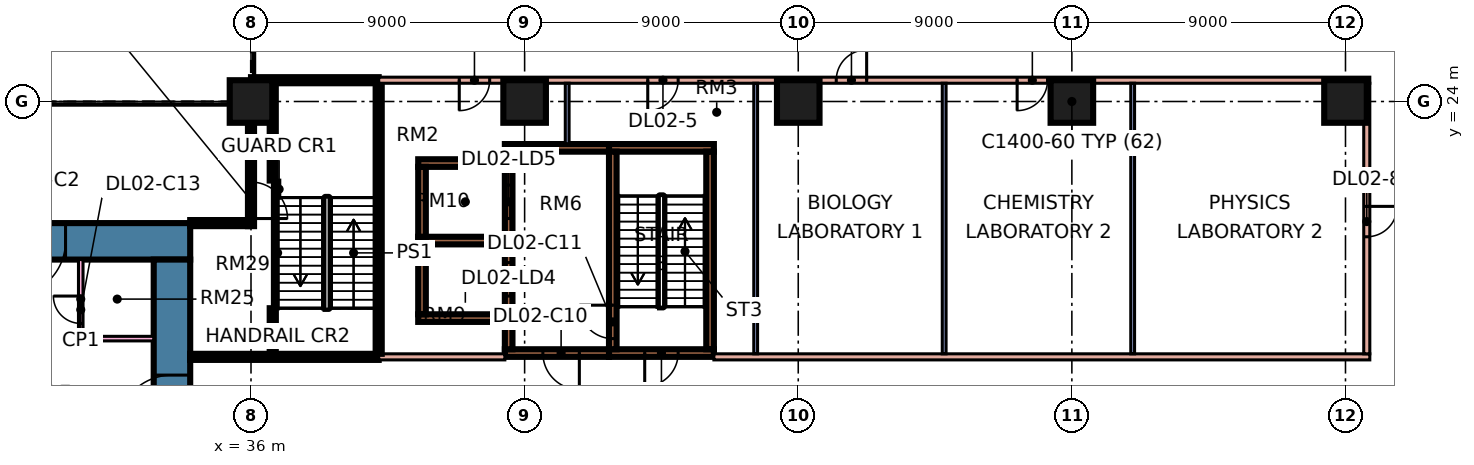
"""IFC4 building model, lengths in metres.
Left out: names, types, materials, properties, quantities, classifications, styles, units other than length and angle.
Written with IfcOpenShell. Run it as: python <this file> out.ifc"""

import sys

from ifc_helpers import new_model, si_unit, direction, frame, frame_2d, origin, origin_2d, place, context, subcontext, project, spatial, rectangle, extrude, element, fill, save


model = new_model("IFC4")
c1 = context("Model", 3, precision=1e-05, world=origin(), true_north=direction((0.0, 1.0)))
c2 = subcontext(c1, "Body", "Model", "MODEL_VIEW")
j1 = project(units=[si_unit("LENGTHUNIT", "METRE"), si_unit("PLANEANGLEUNIT", "RADIAN")], contexts=[c1])
p1 = place(None, origin())
s1 = spatial("IfcSite", under=j1, at=p1, CompositionType="ELEMENT")
p2 = place(p1, origin())
s2 = spatial("IfcBuilding", under=s1, at=p2, CompositionType="ELEMENT")
p3 = place(p2, frame((0.0, 0.0, 12.0)))
s3 = spatial("IfcBuildingStorey", under=s2, at=p3, CompositionType="ELEMENT", Elevation=12.0)
for number, where, z_axis, x_axis in (
    (1, (36.0, 24.0, 0.0), (0.0, 0.0, 1.0), (1.0, 0.0, 0.0)),
    (2, (45.0, 24.0, 0.0), (0.0, 0.0, 1.0), (1.0, 0.0, 0.0)),
    (3, (54.0, 24.0, 0.0), (0.0, 0.0, 1.0), (1.0, 0.0, 0.0)),
    (4, (63.0, 24.0, 0.0), (0.0, 0.0, 1.0), (1.0, 0.0, 0.0)),
    (5, (72.0, 24.0, 0.0), (0.0, 0.0, 1.0), (1.0, 0.0, 0.0)),
):
    element("IfcColumn", number, at=place(p3, frame(where, z_axis=z_axis, x_axis=x_axis)), inside=s3, PredefinedType="COLUMN", context=c2, shape_type="SweptSolid", body=[
        extrude(rectangle(XDim=1.4, YDim=1.4, at=origin_2d()), origin(), (0.0, 0.0, 1.0), 4.8),
    ])
p4 = place(p3, frame((9.0, 19.4, 0.0), z_axis=(0.0, 0.0, 1.0), x_axis=(1.0, 0.0, 0.0)))
e6 = element("IfcWall", 6, at=p4, inside=s3, PredefinedType="SHEAR", context=c2, shape_type="SweptSolid", body=[
    extrude(rectangle(XDim=25.0, YDim=1.2, at=frame_2d((12.5, 0.0))), origin(), (0.0, 0.0, 1.0), 4.8),
])
p5 = place(p4, frame((19.1, 0.0, 0.0)))
e7 = element("IfcOpeningElement", 7, at=p5, cuts=e6, PredefinedType="OPENING", context=c2, shape_type="SweptSolid", body=[
    extrude(rectangle(XDim=1.8, YDim=2.4, at=frame_2d((0.9, 1.2))), frame((0.0, 0.61, 0.0), z_axis=(0.0, -1.0, 0.0), x_axis=(1.0, 0.0, 0.0)), (0.0, 0.0, 1.0), 1.22),
])
p6 = place(p3, frame((33.4, 8.2, 0.0), z_axis=(0.0, 0.0, 1.0), x_axis=(0.0, 1.0, 0.0)))
e8 = element("IfcWall", 8, at=p6, inside=s3, PredefinedType="SHEAR", context=c2, shape_type="SweptSolid", body=[
    extrude(rectangle(XDim=10.6, YDim=1.2, at=frame_2d((5.3, 0.0))), origin(), (0.0, 0.0, 1.0), 4.8),
])
p7 = place(p6, frame((5.0, 0.0, 0.0)))
e9 = element("IfcOpeningElement", 9, at=p7, cuts=e8, PredefinedType="OPENING", context=c2, shape_type="SweptSolid", body=[
    extrude(rectangle(XDim=1.8, YDim=2.4, at=frame_2d((0.9, 1.2))), frame((0.0, 0.61, 0.0), z_axis=(0.0, -1.0, 0.0), x_axis=(1.0, 0.0, 0.0)), (0.0, 0.0, 1.0), 1.22),
])
p8 = place(p3, frame((47.775, 15.725, 0.0), z_axis=(0.0, 0.0, 1.0), x_axis=(1.0, 0.0, 0.0)))
e10 = element("IfcWall", 10, at=p8, inside=s3, PredefinedType="SHEAR", context=c2, shape_type="SweptSolid", body=[
    extrude(rectangle(XDim=3.45, YDim=0.25, at=frame_2d((1.725, 0.0))), origin(), (0.0, 0.0, 1.0), 4.8),
])
p9 = place(p8, frame((1.175, 0.0, 0.0)))
e11 = element("IfcOpeningElement", 11, at=p9, cuts=e10, PredefinedType="OPENING", context=c2, shape_type="SweptSolid", body=[
    extrude(rectangle(XDim=1.1, YDim=2.2, at=frame_2d((0.55, 1.1))), frame((0.0, 0.135, 0.0), z_axis=(0.0, -1.0, 0.0), x_axis=(1.0, 0.0, 0.0)), (0.0, 0.0, 1.0), 0.27),
])
p10 = place(p3, frame((47.775, 22.475, 0.0), z_axis=(0.0, 0.0, 1.0), x_axis=(1.0, 0.0, 0.0)))
e12 = element("IfcWall", 12, at=p10, inside=s3, PredefinedType="SHEAR", context=c2, shape_type="SweptSolid", body=[
    extrude(rectangle(XDim=3.45, YDim=0.25, at=frame_2d((1.725, 0.0))), origin(), (0.0, 0.0, 1.0), 4.8),
])
p11 = place(p3, frame((47.9, 15.85, 0.0), z_axis=(0.0, 0.0, 1.0), x_axis=(0.0, 1.0, 0.0)))
e13 = element("IfcWall", 13, at=p11, inside=s3, PredefinedType="SHEAR", context=c2, shape_type="SweptSolid", body=[
    extrude(rectangle(XDim=6.5, YDim=0.25, at=frame_2d((3.25, 0.0))), origin(), (0.0, 0.0, 1.0), 4.8),
])
p12 = place(p11, frame((0.35, 0.0, 0.0)))
e14 = element("IfcOpeningElement", 14, at=p12, cuts=e13, PredefinedType="OPENING", context=c2, shape_type="SweptSolid", body=[
    extrude(rectangle(XDim=1.1, YDim=2.2, at=frame_2d((0.55, 1.1))), frame((0.0, 0.135, 0.0), z_axis=(0.0, -1.0, 0.0), x_axis=(1.0, 0.0, 0.0)), (0.0, 0.0, 1.0), 0.27),
])
p13 = place(p3, frame((51.1, 15.85, 0.0), z_axis=(0.0, 0.0, 1.0), x_axis=(0.0, 1.0, 0.0)))
e15 = element("IfcWall", 15, at=p13, inside=s3, PredefinedType="SHEAR", context=c2, shape_type="SweptSolid", body=[
    extrude(rectangle(XDim=6.5, YDim=0.25, at=frame_2d((3.25, 0.0))), origin(), (0.0, 0.0, 1.0), 4.8),
])
p14 = place(p3, frame((44.35, 15.725, 0.0), z_axis=(0.0, 0.0, 1.0), x_axis=(1.0, 0.0, 0.0)))
e16 = element("IfcWall", 16, at=p14, inside=s3, PredefinedType="SHEAR", context=c2, shape_type="SweptSolid", body=[
    extrude(rectangle(XDim=3.425, YDim=0.25, at=frame_2d((1.712, 0.0))), origin(), (0.0, 0.0, 1.0), 4.8),
])
p15 = place(p14, frame((1.25, 0.0, 0.0)))
e17 = element("IfcOpeningElement", 17, at=p15, cuts=e16, PredefinedType="OPENING", context=c2, shape_type="SweptSolid", body=[
    extrude(rectangle(XDim=1.2, YDim=2.2, at=frame_2d((0.6, 1.1))), frame((0.0, 0.135, 0.0), z_axis=(0.0, -1.0, 0.0), x_axis=(1.0, 0.0, 0.0)), (0.0, 0.0, 1.0), 0.27),
])
p16 = place(p3, frame((44.35, 22.475, 0.0), z_axis=(0.0, 0.0, 1.0), x_axis=(1.0, 0.0, 0.0)))
e18 = element("IfcWall", 18, at=p16, inside=s3, PredefinedType="SHEAR", context=c2, shape_type="SweptSolid", body=[
    extrude(rectangle(XDim=3.425, YDim=0.25, at=frame_2d((1.712, 0.0))), origin(), (0.0, 0.0, 1.0), 4.8),
])
p17 = place(p3, frame((44.475, 15.85, 0.0), z_axis=(0.0, 0.0, 1.0), x_axis=(0.0, 1.0, 0.0)))
e19 = element("IfcWall", 19, at=p17, inside=s3, PredefinedType="SHEAR", context=c2, shape_type="SweptSolid", body=[
    extrude(rectangle(XDim=6.5, YDim=0.25, at=frame_2d((3.25, 0.0))), origin(), (0.0, 0.0, 1.0), 4.8),
])
p18 = place(p17, frame((1.75, 0.0, 0.0)))
e20 = element("IfcOpeningElement", 20, at=p18, cuts=e19, PredefinedType="OPENING", context=c2, shape_type="SweptSolid", body=[
    extrude(rectangle(XDim=1.1, YDim=2.2, at=frame_2d((0.55, 1.1))), frame((0.0, 0.135, 0.0), z_axis=(0.0, -1.0, 0.0), x_axis=(1.0, 0.0, 0.0)), (0.0, 0.0, 1.0), 0.27),
])
p19 = place(p17, frame((4.3, 0.0, 0.0)))
e21 = element("IfcOpeningElement", 21, at=p19, cuts=e19, PredefinedType="OPENING", context=c2, shape_type="SweptSolid", body=[
    extrude(rectangle(XDim=1.1, YDim=2.2, at=frame_2d((0.55, 1.1))), frame((0.0, 0.135, 0.0), z_axis=(0.0, -1.0, 0.0), x_axis=(1.0, 0.0, 0.0)), (0.0, 0.0, 1.0), 0.27),
])
for number, where, z_axis, x_axis in (
    (22, (41.5, 16.875, 0.0), (0.0, 0.0, 1.0), (1.0, 0.0, 0.0)),
    (23, (41.5, 19.425, 0.0), (0.0, 0.0, 1.0), (1.0, 0.0, 0.0)),
    (24, (41.5, 21.975, 0.0), (0.0, 0.0, 1.0), (1.0, 0.0, 0.0)),
):
    element("IfcWall", number, at=place(p3, frame(where, z_axis=z_axis, x_axis=x_axis)), inside=s3, PredefinedType="SHEAR", context=c2, shape_type="SweptSolid", body=[
        extrude(rectangle(XDim=2.85, YDim=0.25, at=frame_2d((1.425, 0.0))), origin(), (0.0, 0.0, 1.0), 4.8),
    ])
for number, where, z_axis, x_axis in (
    (25, (41.625, 17.0, 0.0), (0.0, 0.0, 1.0), (0.0, 1.0, 0.0)),
    (26, (41.625, 19.55, 0.0), (0.0, 0.0, 1.0), (0.0, 1.0, 0.0)),
):
    element("IfcWall", number, at=place(p3, frame(where, z_axis=z_axis, x_axis=x_axis)), inside=s3, PredefinedType="SHEAR", context=c2, shape_type="SweptSolid", body=[
        extrude(rectangle(XDim=2.3, YDim=0.25, at=frame_2d((1.15, 0.0))), origin(), (0.0, 0.0, 1.0), 4.8),
    ])
p20 = place(p3, frame((30.4, 16.2, 0.0), z_axis=(0.0, 0.0, 1.0), x_axis=(0.0, 1.0, 0.0)))
e27 = element("IfcWall", 27, at=p20, inside=s3, PredefinedType="PARTITIONING", context=c2, shape_type="SweptSolid", body=[
    extrude(rectangle(XDim=2.6, YDim=0.15, at=frame_2d((1.3, 0.0))), origin(), (0.0, 0.0, 1.0), 4.4),
])
p21 = place(p20, frame((0.5, 0.0, 0.0)))
e28 = element("IfcOpeningElement", 28, at=p21, cuts=e27, PredefinedType="OPENING", context=c2, shape_type="SweptSolid", body=[
    extrude(rectangle(XDim=0.9, YDim=2.1, at=frame_2d((0.45, 1.05))), frame((0.0, 0.085, 0.0), z_axis=(0.0, -1.0, 0.0), x_axis=(1.0, 0.0, 0.0)), (0.0, 0.0, 1.0), 0.17),
])
p22 = place(p3, frame((30.4, 16.2, 0.0), z_axis=(0.0, 0.0, 1.0), x_axis=(1.0, 0.0, 0.0)))
e29 = element("IfcWall", 29, at=p22, inside=s3, PredefinedType="PARTITIONING", context=c2, shape_type="SweptSolid", body=[
    extrude(rectangle(XDim=2.4, YDim=0.15, at=frame_2d((1.2, 0.0))), origin(), (0.0, 0.0, 1.0), 4.4),
])
p23 = place(p3, frame((34.0, 15.6, 0.0), z_axis=(0.0, 0.0, 1.0), x_axis=(1.0, 0.0, 0.0)))
e30 = element("IfcWall", 30, at=p23, inside=s3, PredefinedType="SOLIDWALL", context=c2, shape_type="SweptSolid", body=[
    extrude(rectangle(XDim=6.2, YDim=0.2, at=frame_2d((3.1, 0.0))), origin(), (0.0, 0.0, 1.0), 4.4),
])
p24 = place(p3, frame((34.0, 20.0, 0.0), z_axis=(0.0, 0.0, 1.0), x_axis=(1.0, 0.0, 0.0)))
e31 = element("IfcWall", 31, at=p24, inside=s3, PredefinedType="SOLIDWALL", context=c2, shape_type="SweptSolid", body=[
    extrude(rectangle(XDim=1.9, YDim=0.2, at=frame_2d((0.95, 0.0))), origin(), (0.0, 0.0, 1.0), 4.4),
])
p25 = place(p3, frame((36.0, 19.9, 0.0), z_axis=(0.0, 0.0, 1.0), x_axis=(0.0, 1.0, 0.0)))
e32 = element("IfcWall", 32, at=p25, inside=s3, PredefinedType="SOLIDWALL", context=c2, shape_type="SweptSolid", body=[
    extrude(rectangle(XDim=4.1, YDim=0.2, at=frame_2d((2.05, 0.0))), origin(), (0.0, 0.0, 1.0), 4.4),
])
p26 = place(p25, frame((0.25, 0.0, 0.0)))
e33 = element("IfcOpeningElement", 33, at=p26, cuts=e32, PredefinedType="OPENING", context=c2, shape_type="SweptSolid", body=[
    extrude(rectangle(XDim=1.2, YDim=2.1, at=frame_2d((0.6, 1.05))), frame((0.0, 0.11, 0.0), z_axis=(0.0, -1.0, 0.0), x_axis=(1.0, 0.0, 0.0)), (0.0, 0.0, 1.0), 0.22),
])
p27 = place(p3, frame((36.0, 24.7, 0.0), z_axis=(0.0, 0.0, 1.0), x_axis=(1.0, 0.0, 0.0)))
e34 = element("IfcWall", 34, at=p27, inside=s3, PredefinedType="SOLIDWALL", context=c2, shape_type="SweptSolid", body=[
    extrude(rectangle(XDim=4.2, YDim=0.2, at=frame_2d((2.1, 0.0))), origin(), (0.0, 0.0, 1.0), 4.4),
])
p28 = place(p3, frame((40.2, 15.6, 0.0), z_axis=(0.0, 0.0, 1.0), x_axis=(1.0, 0.0, 0.0)))
e35 = element("IfcWall", 35, at=p28, inside=s3, PredefinedType="PARTITIONING", context=c2, shape_type="SweptSolid", body=[
    extrude(rectangle(XDim=4.15, YDim=0.2, at=frame_2d((2.075, 0.0))), origin(), (0.0, 0.0, 1.0), 4.4),
])
p29 = place(p3, frame((40.2, 15.7, 0.0), z_axis=(0.0, 0.0, 1.0), x_axis=(0.0, 1.0, 0.0)))
e36 = element("IfcWall", 36, at=p29, inside=s3, PredefinedType="SOLIDWALL", context=c2, shape_type="SweptSolid", body=[
    extrude(rectangle(XDim=8.9, YDim=0.2, at=frame_2d((4.45, 0.0))), origin(), (0.0, 0.0, 1.0), 4.4),
])
p30 = place(p3, frame((40.2, 24.7, 0.0), z_axis=(0.0, 0.0, 1.0), x_axis=(1.0, 0.0, 0.0)))
e37 = element("IfcWall", 37, at=p30, inside=s3, PredefinedType="PARTITIONING", context=c2, shape_type="SweptSolid", body=[
    extrude(rectangle(XDim=32.6, YDim=0.2, at=frame_2d((16.3, 0.0))), origin(), (0.0, 0.0, 1.0), 4.4),
])
p31 = place(p30, frame((2.65, 0.0, 0.0)))
e38 = element("IfcOpeningElement", 38, at=p31, cuts=e37, PredefinedType="OPENING", context=c2, shape_type="SweptSolid", body=[
    extrude(rectangle(XDim=1.0, YDim=2.1, at=frame_2d((0.5, 1.05))), frame((0.0, 0.11, 0.0), z_axis=(0.0, -1.0, 0.0), x_axis=(1.0, 0.0, 0.0)), (0.0, 0.0, 1.0), 0.22),
])
p32 = place(p30, frame((8.85, 0.0, 0.0)))
e39 = element("IfcOpeningElement", 39, at=p32, cuts=e37, PredefinedType="OPENING", context=c2, shape_type="SweptSolid", body=[
    extrude(rectangle(XDim=1.0, YDim=2.1, at=frame_2d((0.5, 1.05))), frame((0.0, 0.11, 0.0), z_axis=(0.0, -1.0, 0.0), x_axis=(1.0, 0.0, 0.0)), (0.0, 0.0, 1.0), 0.22),
])
p33 = place(p30, frame((15.05, 0.0, 0.0)))
e40 = element("IfcOpeningElement", 40, at=p33, cuts=e37, PredefinedType="OPENING", context=c2, shape_type="SweptSolid", body=[
    extrude(rectangle(XDim=1.0, YDim=2.1, at=frame_2d((0.5, 1.05))), frame((0.0, 0.11, 0.0), z_axis=(0.0, -1.0, 0.0), x_axis=(1.0, 0.0, 0.0)), (0.0, 0.0, 1.0), 0.22),
])
p34 = place(p30, frame((21.0, 0.0, 0.0)))
e41 = element("IfcOpeningElement", 41, at=p34, cuts=e37, PredefinedType="OPENING", context=c2, shape_type="SweptSolid", body=[
    extrude(rectangle(XDim=1.0, YDim=2.1, at=frame_2d((0.5, 1.05))), frame((0.0, 0.11, 0.0), z_axis=(0.0, -1.0, 0.0), x_axis=(1.0, 0.0, 0.0)), (0.0, 0.0, 1.0), 0.22),
])
p35 = place(p3, frame((46.4, 22.6, 0.0), z_axis=(0.0, 0.0, 1.0), x_axis=(0.0, 1.0, 0.0)))
e42 = element("IfcWall", 42, at=p35, inside=s3, PredefinedType="PARTITIONING", context=c2, shape_type="SweptSolid", body=[
    extrude(rectangle(XDim=2.0, YDim=0.125, at=frame_2d((1.0, 0.0))), origin(), (0.0, 0.0, 1.0), 4.4),
])
p36 = place(p3, frame((51.225, 15.6, 0.0), z_axis=(0.0, 0.0, 1.0), x_axis=(1.0, 0.0, 0.0)))
e43 = element("IfcWall", 43, at=p36, inside=s3, PredefinedType="PARTITIONING", context=c2, shape_type="SweptSolid", body=[
    extrude(rectangle(XDim=21.575, YDim=0.2, at=frame_2d((10.788, 0.0))), origin(), (0.0, 0.0, 1.0), 4.4),
])
for number, where, z_axis, x_axis in (
    (44, (52.6, 15.7, 0.0), (0.0, 0.0, 1.0), (0.0, 1.0, 0.0)),
    (45, (58.8, 15.7, 0.0), (0.0, 0.0, 1.0), (0.0, 1.0, 0.0)),
    (46, (65.0, 15.7, 0.0), (0.0, 0.0, 1.0), (0.0, 1.0, 0.0)),
):
    element("IfcWall", number, at=place(p3, frame(where, z_axis=z_axis, x_axis=x_axis)), inside=s3, PredefinedType="PARTITIONING", context=c2, shape_type="SweptSolid", body=[
        extrude(rectangle(XDim=8.9, YDim=0.125, at=frame_2d((4.45, 0.0))), origin(), (0.0, 0.0, 1.0), 4.4),
    ])
p37 = place(p3, frame((72.7, 15.7, 0.0), z_axis=(0.0, 0.0, 1.0), x_axis=(0.0, 1.0, 0.0)))
e47 = element("IfcWall", 47, at=p37, inside=s3, PredefinedType="PARTITIONING", context=c2, shape_type="SweptSolid", body=[
    extrude(rectangle(XDim=8.9, YDim=0.2, at=frame_2d((4.45, 0.0))), origin(), (0.0, 0.0, 1.0), 4.4),
])
p38 = place(p37, frame((3.85, 0.0, 0.0)))
e48 = element("IfcOpeningElement", 48, at=p38, cuts=e47, PredefinedType="OPENING", context=c2, shape_type="SweptSolid", body=[
    extrude(rectangle(XDim=1.0, YDim=2.1, at=frame_2d((0.5, 1.05))), frame((0.0, 0.11, 0.0), z_axis=(0.0, -1.0, 0.0), x_axis=(1.0, 0.0, 0.0)), (0.0, 0.0, 1.0), 0.22),
])
p39 = place(p3, frame((36.715, 21.4, 0.0), z_axis=(0.0, 0.0, 1.0), x_axis=(0.0, 1.0, 0.0)))
e49 = element("IfcWall", 49, at=p39, inside=s3, PredefinedType="SOLIDWALL", context=c2, shape_type="SweptSolid", body=[
    extrude(rectangle(XDim=3.2, YDim=0.2, at=frame_2d((1.6, 0.0))), origin(), (0.0, 0.0, 1.0), 4.4),
])
p40 = place(p3, frame((36.715, 15.7, 0.0), z_axis=(0.0, 0.0, 1.0), x_axis=(0.0, 1.0, 0.0)))
e50 = element("IfcWall", 50, at=p40, inside=s3, PredefinedType="SOLIDWALL", context=c2, shape_type="SweptSolid", body=[
    extrude(rectangle(XDim=1.5, YDim=0.2, at=frame_2d((0.75, 0.0))), origin(), (0.0, 0.0, 1.0), 4.4),
])
p41 = place(p7, origin())
e51 = element("IfcDoor", 51, at=p41, inside=s3, OperationType="DOUBLE_DOOR_SINGLE_SWING", PredefinedType="DOOR", context=c2, shape_type="SweptSolid", body=[
    extrude(rectangle(XDim=1.8, YDim=2.4, at=frame_2d((0.9, 1.2))), frame((0.0, 0.025, 0.0), z_axis=(0.0, -1.0, 0.0), x_axis=(1.0, 0.0, 0.0)), (0.0, 0.0, 1.0), 0.05),
])
fill(e9, e51)
p42 = place(p5, frame((1.8, 0.0, 0.0), z_axis=(0.0, 0.0, 1.0), x_axis=(-1.0, 0.0, 0.0)))
e52 = element("IfcDoor", 52, at=p42, inside=s3, OperationType="DOUBLE_DOOR_SINGLE_SWING", PredefinedType="DOOR", context=c2, shape_type="SweptSolid", body=[
    extrude(rectangle(XDim=1.8, YDim=2.4, at=frame_2d((0.9, 1.2))), frame((0.0, 0.025, 0.0), z_axis=(0.0, -1.0, 0.0), x_axis=(1.0, 0.0, 0.0)), (0.0, 0.0, 1.0), 0.05),
])
fill(e7, e52)
p43 = place(p9, frame((1.1, 0.0, 0.0), z_axis=(0.0, 0.0, 1.0), x_axis=(-1.0, 0.0, 0.0)))
e53 = element("IfcDoor", 53, at=p43, inside=s3, OperationType="SINGLE_SWING_LEFT", PredefinedType="DOOR", context=c2, shape_type="SweptSolid", body=[
    extrude(rectangle(XDim=1.1, YDim=2.2, at=frame_2d((0.55, 1.1))), frame((0.0, 0.025, 0.0), z_axis=(0.0, -1.0, 0.0), x_axis=(1.0, 0.0, 0.0)), (0.0, 0.0, 1.0), 0.05),
])
fill(e11, e53)
p44 = place(p15, origin())
e54 = element("IfcDoor", 54, at=p44, inside=s3, OperationType="SINGLE_SWING_RIGHT", PredefinedType="DOOR", context=c2, shape_type="SweptSolid", body=[
    extrude(rectangle(XDim=1.2, YDim=2.2, at=frame_2d((0.6, 1.1))), frame((0.0, 0.025, 0.0), z_axis=(0.0, -1.0, 0.0), x_axis=(1.0, 0.0, 0.0)), (0.0, 0.0, 1.0), 0.05),
])
fill(e17, e54)
p45 = place(p12, frame((1.1, 0.0, 0.0), z_axis=(0.0, 0.0, 1.0), x_axis=(-1.0, 0.0, 0.0)))
e55 = element("IfcDoor", 55, at=p45, inside=s3, OperationType="SINGLE_SWING_RIGHT", PredefinedType="DOOR", context=c2, shape_type="SweptSolid", body=[
    extrude(rectangle(XDim=1.1, YDim=2.2, at=frame_2d((0.55, 1.1))), frame((0.0, 0.025, 0.0), z_axis=(0.0, -1.0, 0.0), x_axis=(1.0, 0.0, 0.0)), (0.0, 0.0, 1.0), 0.05),
])
fill(e14, e55)
p46 = place(p18, origin())
e56 = element("IfcDoor", 56, at=p46, inside=s3, OperationType="DOUBLE_DOOR_SLIDING", PredefinedType="DOOR", context=c2, shape_type="SweptSolid", body=[
    extrude(rectangle(XDim=1.1, YDim=2.2, at=frame_2d((0.55, 1.1))), frame((0.0, 0.025, 0.0), z_axis=(0.0, -1.0, 0.0), x_axis=(1.0, 0.0, 0.0)), (0.0, 0.0, 1.0), 0.05),
])
fill(e20, e56)
p47 = place(p19, origin())
e57 = element("IfcDoor", 57, at=p47, inside=s3, OperationType="DOUBLE_DOOR_SLIDING", PredefinedType="DOOR", context=c2, shape_type="SweptSolid", body=[
    extrude(rectangle(XDim=1.1, YDim=2.2, at=frame_2d((0.55, 1.1))), frame((0.0, 0.025, 0.0), z_axis=(0.0, -1.0, 0.0), x_axis=(1.0, 0.0, 0.0)), (0.0, 0.0, 1.0), 0.05),
])
fill(e21, e57)
p48 = place(p21, frame((0.9, 0.0, 0.0), z_axis=(0.0, 0.0, 1.0), x_axis=(-1.0, 0.0, 0.0)))
e58 = element("IfcDoor", 58, at=p48, inside=s3, OperationType="SINGLE_SWING_RIGHT", PredefinedType="DOOR", context=c2, shape_type="SweptSolid", body=[
    extrude(rectangle(XDim=0.9, YDim=2.1, at=frame_2d((0.45, 1.05))), frame((0.0, 0.025, 0.0), z_axis=(0.0, -1.0, 0.0), x_axis=(1.0, 0.0, 0.0)), (0.0, 0.0, 1.0), 0.05),
])
fill(e28, e58)
p49 = place(p31, frame((1.0, 0.0, 0.0), z_axis=(0.0, 0.0, 1.0), x_axis=(-1.0, 0.0, 0.0)))
e59 = element("IfcDoor", 59, at=p49, inside=s3, OperationType="SINGLE_SWING_LEFT", PredefinedType="DOOR", context=c2, shape_type="SweptSolid", body=[
    extrude(rectangle(XDim=1.0, YDim=2.1, at=frame_2d((0.5, 1.05))), frame((0.0, 0.025, 0.0), z_axis=(0.0, -1.0, 0.0), x_axis=(1.0, 0.0, 0.0)), (0.0, 0.0, 1.0), 0.05),
])
fill(e38, e59)
p50 = place(p32, frame((1.0, 0.0, 0.0), z_axis=(0.0, 0.0, 1.0), x_axis=(-1.0, 0.0, 0.0)))
e60 = element("IfcDoor", 60, at=p50, inside=s3, OperationType="SINGLE_SWING_LEFT", PredefinedType="DOOR", context=c2, shape_type="SweptSolid", body=[
    extrude(rectangle(XDim=1.0, YDim=2.1, at=frame_2d((0.5, 1.05))), frame((0.0, 0.025, 0.0), z_axis=(0.0, -1.0, 0.0), x_axis=(1.0, 0.0, 0.0)), (0.0, 0.0, 1.0), 0.05),
])
fill(e39, e60)
p51 = place(p33, frame((1.0, 0.0, 0.0), z_axis=(0.0, 0.0, 1.0), x_axis=(-1.0, 0.0, 0.0)))
e61 = element("IfcDoor", 61, at=p51, inside=s3, OperationType="SINGLE_SWING_RIGHT", PredefinedType="DOOR", context=c2, shape_type="SweptSolid", body=[
    extrude(rectangle(XDim=1.0, YDim=2.1, at=frame_2d((0.5, 1.05))), frame((0.0, 0.025, 0.0), z_axis=(0.0, -1.0, 0.0), x_axis=(1.0, 0.0, 0.0)), (0.0, 0.0, 1.0), 0.05),
])
fill(e40, e61)
p52 = place(p34, frame((1.0, 0.0, 0.0), z_axis=(0.0, 0.0, 1.0), x_axis=(-1.0, 0.0, 0.0)))
e62 = element("IfcDoor", 62, at=p52, inside=s3, OperationType="SINGLE_SWING_LEFT", PredefinedType="DOOR", context=c2, shape_type="SweptSolid", body=[
    extrude(rectangle(XDim=1.0, YDim=2.1, at=frame_2d((0.5, 1.05))), frame((0.0, 0.025, 0.0), z_axis=(0.0, -1.0, 0.0), x_axis=(1.0, 0.0, 0.0)), (0.0, 0.0, 1.0), 0.05),
])
fill(e41, e62)
p53 = place(p38, origin())
e63 = element("IfcDoor", 63, at=p53, inside=s3, OperationType="SINGLE_SWING_RIGHT", PredefinedType="DOOR", context=c2, shape_type="SweptSolid", body=[
    extrude(rectangle(XDim=1.0, YDim=2.1, at=frame_2d((0.5, 1.05))), frame((0.0, 0.025, 0.0), z_axis=(0.0, -1.0, 0.0), x_axis=(1.0, 0.0, 0.0)), (0.0, 0.0, 1.0), 0.05),
])
fill(e48, e63)
p54 = place(p26, frame((1.2, 0.0, 0.0), z_axis=(0.0, 0.0, 1.0), x_axis=(-1.0, 0.0, 0.0)))
e64 = element("IfcDoor", 64, at=p54, inside=s3, OperationType="SINGLE_SWING_LEFT", PredefinedType="DOOR", context=c2, shape_type="SweptSolid", body=[
    extrude(rectangle(XDim=1.2, YDim=2.1, at=frame_2d((0.6, 1.05))), frame((0.0, 0.025, 0.0), z_axis=(0.0, -1.0, 0.0), x_axis=(1.0, 0.0, 0.0)), (0.0, 0.0, 1.0), 0.05),
])
fill(e33, e64)
save(model, sys.argv[1])
